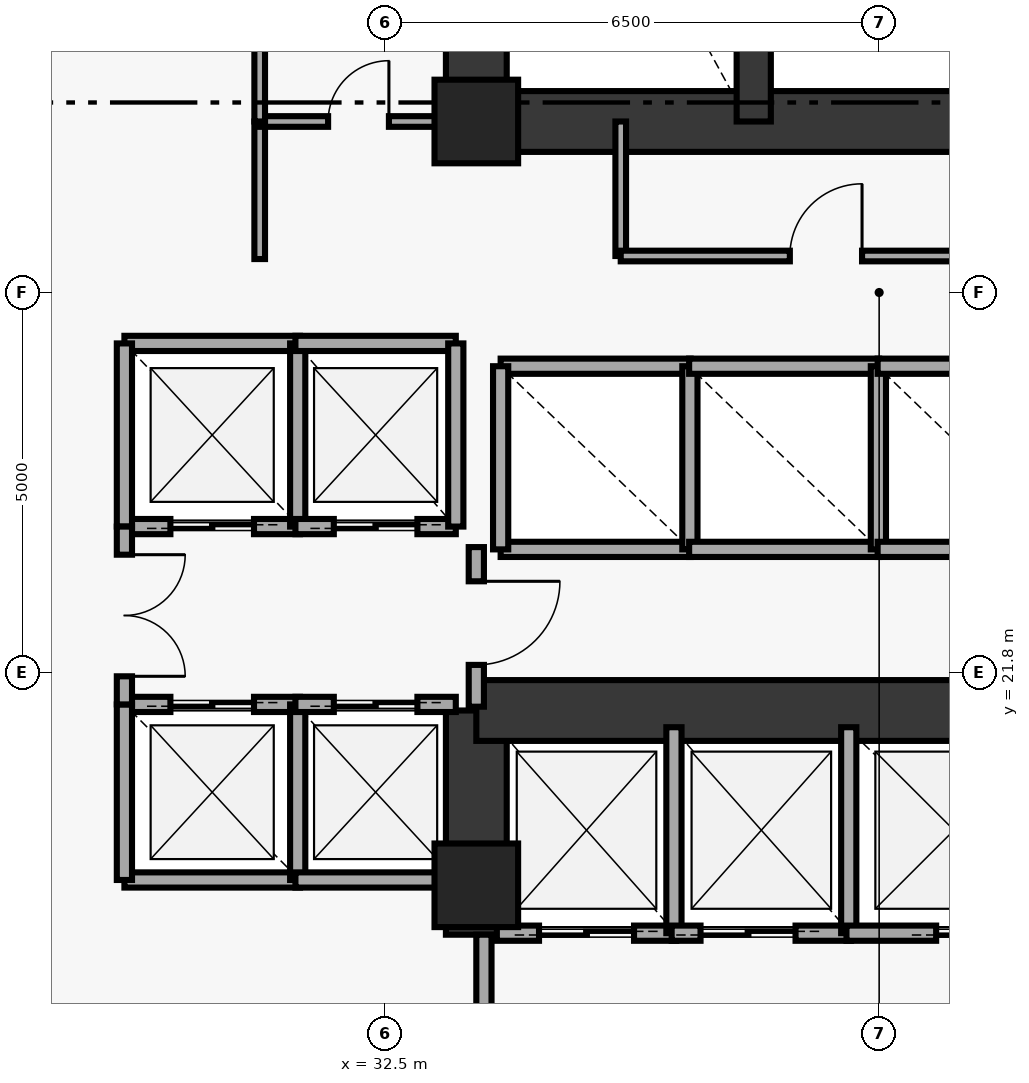
"""IFC4 building model, lengths in metres.
Left out: names, types, materials, properties, quantities, classifications, styles, units other than length and angle.
Written with IfcOpenShell. Run it as: python <this file> out.ifc"""

import sys

from ifc_helpers import new_model, si_unit, direction, frame, frame_2d, origin, origin_2d, place, context, subcontext, project, spatial, rectangle, extrude, element, fill, save


model = new_model("IFC4")
c1 = context("Model", 3, precision=1e-05, world=origin(), true_north=direction((0.0, 1.0)))
c2 = subcontext(c1, "Body", "Model", "MODEL_VIEW")
j1 = project(units=[si_unit("LENGTHUNIT", "METRE"), si_unit("PLANEANGLEUNIT", "RADIAN")], contexts=[c1])
p1 = place(None, origin())
s1 = spatial("IfcSite", under=j1, at=p1, CompositionType="ELEMENT")
p2 = place(p1, origin())
s2 = spatial("IfcBuilding", under=s1, at=p2, CompositionType="ELEMENT")
p3 = place(p2, frame((0.0, 0.0, 53.4)))
s3 = spatial("IfcBuildingStorey", under=s2, at=p3, CompositionType="ELEMENT", Elevation=53.4)
for number, where, z_axis, x_axis in (
    (1, (33.7, 19.0, 0.0), (0.0, 0.0, 1.0), (1.0, 0.0, 0.0)),
    (2, (33.7, 29.05, 0.0), (0.0, 0.0, 1.0), (1.0, 0.0, 0.0)),
):
    element("IfcColumn", number, at=place(p3, frame(where, z_axis=z_axis, x_axis=x_axis)), inside=s3, PredefinedType="PILASTER", context=c2, shape_type="SweptSolid", body=[
        extrude(rectangle(XDim=1.1, YDim=1.1, at=origin_2d()), origin(), (0.0, 0.0, 1.0), 3.8),
    ])
p4 = place(p3, frame((33.7, 29.05, 0.0), z_axis=(0.0, 0.0, 1.0), x_axis=(0.0, 1.0, 0.0)))
e3 = element("IfcWall", 3, at=p4, inside=s3, PredefinedType="SHEAR", context=c2, shape_type="SweptSolid", body=[
    extrude(rectangle(XDim=8.35, YDim=0.8, at=frame_2d((4.175, 0.0))), origin(), (0.0, 0.0, 1.0), 3.8),
])
p5 = place(p3, frame((33.7, 18.35, 0.0), z_axis=(0.0, 0.0, 1.0), x_axis=(0.0, 1.0, 0.0)))
e4 = element("IfcWall", 4, at=p5, inside=s3, PredefinedType="SHEAR", context=c2, shape_type="SweptSolid", body=[
    extrude(rectangle(XDim=2.95, YDim=0.8, at=frame_2d((1.475, 0.0))), origin(), (0.0, 0.0, 1.0), 3.8),
])
p6 = place(p3, frame((33.7, 29.05, 0.0), z_axis=(0.0, 0.0, 1.0), x_axis=(1.0, 0.0, 0.0)))
e5 = element("IfcWall", 5, at=p6, inside=s3, PredefinedType="SHEAR", context=c2, shape_type="SweptSolid", body=[
    extrude(rectangle(XDim=10.6, YDim=0.8, at=frame_2d((5.3, 0.0))), origin(), (0.0, 0.0, 1.0), 3.8),
])
p7 = place(p3, frame((33.7, 21.3, 0.0), z_axis=(0.0, 0.0, 1.0), x_axis=(1.0, 0.0, 0.0)))
e6 = element("IfcWall", 6, at=p7, inside=s3, PredefinedType="SHEAR", context=c2, shape_type="SweptSolid", body=[
    extrude(rectangle(XDim=7.55, YDim=0.8, at=frame_2d((3.775, 0.0))), origin(), (0.0, 0.0, 1.0), 3.8),
])
p8 = place(p3, frame((37.35, 29.05, 0.0), z_axis=(0.0, 0.0, 1.0), x_axis=(0.0, 1.0, 0.0)))
e7 = element("IfcWall", 7, at=p8, inside=s3, PredefinedType="SHEAR", context=c2, shape_type="SweptSolid", body=[
    extrude(rectangle(XDim=8.35, YDim=0.45, at=frame_2d((4.175, 0.0))), origin(), (0.0, 0.0, 1.0), 3.8),
])
p9 = place(p3, frame((35.6, 27.28, 0.0), z_axis=(0.0, 0.0, 1.0), x_axis=(0.0, 1.0, 0.0)))
e8 = element("IfcWall", 8, at=p9, inside=s3, PredefinedType="PARTITIONING", context=c2, shape_type="SweptSolid", body=[
    extrude(rectangle(XDim=1.77, YDim=0.14, at=frame_2d((0.885, 0.0))), origin(), (0.0, 0.0, 1.0), 3.8),
])
p10 = place(p3, frame((29.07, 23.72, 0.0), z_axis=(0.0, 0.0, 1.0), x_axis=(1.0, 0.0, 0.0)))
e9 = element("IfcWall", 9, at=p10, inside=s3, PredefinedType="SOLIDWALL", context=c2, shape_type="SweptSolid", body=[
    extrude(rectangle(XDim=2.31, YDim=0.2, at=frame_2d((1.155, 0.0))), origin(), (0.0, 0.0, 1.0), 3.8),
])
p11 = place(p10, frame((0.605, 0.0, 0.0)))
e10 = element("IfcOpeningElement", 10, at=p11, cuts=e9, PredefinedType="OPENING", context=c2, shape_type="SweptSolid", body=[
    extrude(rectangle(XDim=1.1, YDim=2.15, at=frame_2d((0.55, 1.075))), frame((0.0, 0.11, 0.0), z_axis=(0.0, -1.0, 0.0), x_axis=(1.0, 0.0, 0.0)), (0.0, 0.0, 1.0), 0.22),
])
p12 = place(p3, frame((29.07, 26.13, 0.0), z_axis=(0.0, 0.0, 1.0), x_axis=(1.0, 0.0, 0.0)))
e11 = element("IfcWall", 11, at=p12, inside=s3, PredefinedType="SOLIDWALL", context=c2, shape_type="SweptSolid", body=[
    extrude(rectangle(XDim=2.31, YDim=0.2, at=frame_2d((1.155, 0.0))), origin(), (0.0, 0.0, 1.0), 3.8),
])
for number, where, z_axis, x_axis in (
    (12, (29.07, 23.72, 0.0), (0.0, 0.0, 1.0), (0.0, 1.0, 0.0)),
    (13, (31.35, 23.72, 0.0), (0.0, 0.0, 1.0), (0.0, 1.0, 0.0)),
):
    element("IfcWall", number, at=place(p3, frame(where, z_axis=z_axis, x_axis=x_axis)), inside=s3, PredefinedType="SOLIDWALL", context=c2, shape_type="SweptSolid", body=[
        extrude(rectangle(XDim=2.41, YDim=0.2, at=frame_2d((1.205, 0.0))), origin(), (0.0, 0.0, 1.0), 3.8),
    ])
p13 = place(p3, frame((31.32, 23.72, 0.0), z_axis=(0.0, 0.0, 1.0), x_axis=(1.0, 0.0, 0.0)))
e14 = element("IfcWall", 14, at=p13, inside=s3, PredefinedType="SOLIDWALL", context=c2, shape_type="SweptSolid", body=[
    extrude(rectangle(XDim=2.11, YDim=0.2, at=frame_2d((1.055, 0.0))), origin(), (0.0, 0.0, 1.0), 3.8),
])
p14 = place(p13, frame((0.505, 0.0, 0.0)))
e15 = element("IfcOpeningElement", 15, at=p14, cuts=e14, PredefinedType="OPENING", context=c2, shape_type="SweptSolid", body=[
    extrude(rectangle(XDim=1.1, YDim=2.15, at=frame_2d((0.55, 1.075))), frame((0.0, 0.11, 0.0), z_axis=(0.0, -1.0, 0.0), x_axis=(1.0, 0.0, 0.0)), (0.0, 0.0, 1.0), 0.22),
])
p15 = place(p3, frame((31.32, 26.13, 0.0), z_axis=(0.0, 0.0, 1.0), x_axis=(1.0, 0.0, 0.0)))
e16 = element("IfcWall", 16, at=p15, inside=s3, PredefinedType="SOLIDWALL", context=c2, shape_type="SweptSolid", body=[
    extrude(rectangle(XDim=2.11, YDim=0.2, at=frame_2d((1.055, 0.0))), origin(), (0.0, 0.0, 1.0), 3.8),
])
p16 = place(p3, frame((33.43, 23.72, 0.0), z_axis=(0.0, 0.0, 1.0), x_axis=(0.0, 1.0, 0.0)))
e17 = element("IfcWall", 17, at=p16, inside=s3, PredefinedType="SOLIDWALL", context=c2, shape_type="SweptSolid", body=[
    extrude(rectangle(XDim=2.41, YDim=0.2, at=frame_2d((1.205, 0.0))), origin(), (0.0, 0.0, 1.0), 3.8),
])
p17 = place(p3, frame((29.07, 19.07, 0.0), z_axis=(0.0, 0.0, 1.0), x_axis=(1.0, 0.0, 0.0)))
e18 = element("IfcWall", 18, at=p17, inside=s3, PredefinedType="SOLIDWALL", context=c2, shape_type="SweptSolid", body=[
    extrude(rectangle(XDim=2.31, YDim=0.2, at=frame_2d((1.155, 0.0))), origin(), (0.0, 0.0, 1.0), 3.8),
])
p18 = place(p3, frame((29.07, 21.38, 0.0), z_axis=(0.0, 0.0, 1.0), x_axis=(1.0, 0.0, 0.0)))
e19 = element("IfcWall", 19, at=p18, inside=s3, PredefinedType="SOLIDWALL", context=c2, shape_type="SweptSolid", body=[
    extrude(rectangle(XDim=2.31, YDim=0.2, at=frame_2d((1.155, 0.0))), origin(), (0.0, 0.0, 1.0), 3.8),
])
p19 = place(p18, frame((0.605, 0.0, 0.0)))
e20 = element("IfcOpeningElement", 20, at=p19, cuts=e19, PredefinedType="OPENING", context=c2, shape_type="SweptSolid", body=[
    extrude(rectangle(XDim=1.1, YDim=2.15, at=frame_2d((0.55, 1.075))), frame((0.0, 0.11, 0.0), z_axis=(0.0, -1.0, 0.0), x_axis=(1.0, 0.0, 0.0)), (0.0, 0.0, 1.0), 0.22),
])
for number, where, z_axis, x_axis in (
    (21, (29.07, 19.07, 0.0), (0.0, 0.0, 1.0), (0.0, 1.0, 0.0)),
    (22, (31.35, 19.07, 0.0), (0.0, 0.0, 1.0), (0.0, 1.0, 0.0)),
):
    element("IfcWall", number, at=place(p3, frame(where, z_axis=z_axis, x_axis=x_axis)), inside=s3, PredefinedType="SOLIDWALL", context=c2, shape_type="SweptSolid", body=[
        extrude(rectangle(XDim=2.31, YDim=0.2, at=frame_2d((1.155, 0.0))), origin(), (0.0, 0.0, 1.0), 3.8),
    ])
p20 = place(p3, frame((31.32, 19.07, 0.0), z_axis=(0.0, 0.0, 1.0), x_axis=(1.0, 0.0, 0.0)))
e23 = element("IfcWall", 23, at=p20, inside=s3, PredefinedType="SOLIDWALL", context=c2, shape_type="SweptSolid", body=[
    extrude(rectangle(XDim=2.11, YDim=0.2, at=frame_2d((1.055, 0.0))), origin(), (0.0, 0.0, 1.0), 3.8),
])
p21 = place(p3, frame((31.32, 21.38, 0.0), z_axis=(0.0, 0.0, 1.0), x_axis=(1.0, 0.0, 0.0)))
e24 = element("IfcWall", 24, at=p21, inside=s3, PredefinedType="SOLIDWALL", context=c2, shape_type="SweptSolid", body=[
    extrude(rectangle(XDim=2.11, YDim=0.2, at=frame_2d((1.055, 0.0))), origin(), (0.0, 0.0, 1.0), 3.8),
])
p22 = place(p21, frame((0.505, 0.0, 0.0)))
e25 = element("IfcOpeningElement", 25, at=p22, cuts=e24, PredefinedType="OPENING", context=c2, shape_type="SweptSolid", body=[
    extrude(rectangle(XDim=1.1, YDim=2.15, at=frame_2d((0.55, 1.075))), frame((0.0, 0.11, 0.0), z_axis=(0.0, -1.0, 0.0), x_axis=(1.0, 0.0, 0.0)), (0.0, 0.0, 1.0), 0.22),
])
for number, where, z_axis, x_axis in (
    (26, (34.02, 23.42, 0.0), (0.0, 0.0, 1.0), (1.0, 0.0, 0.0)),
    (27, (34.02, 25.83, 0.0), (0.0, 0.0, 1.0), (1.0, 0.0, 0.0)),
):
    element("IfcWall", number, at=place(p3, frame(where, z_axis=z_axis, x_axis=x_axis)), inside=s3, PredefinedType="SOLIDWALL", context=c2, shape_type="SweptSolid", body=[
        extrude(rectangle(XDim=2.5, YDim=0.2, at=frame_2d((1.25, 0.0))), origin(), (0.0, 0.0, 1.0), 3.8),
    ])
for number, where, z_axis, x_axis in (
    (28, (34.02, 23.42, 0.0), (0.0, 0.0, 1.0), (0.0, 1.0, 0.0)),
    (29, (36.51, 23.42, 0.0), (0.0, 0.0, 1.0), (0.0, 1.0, 0.0)),
):
    element("IfcWall", number, at=place(p3, frame(where, z_axis=z_axis, x_axis=x_axis)), inside=s3, PredefinedType="SOLIDWALL", context=c2, shape_type="SweptSolid", body=[
        extrude(rectangle(XDim=2.41, YDim=0.2, at=frame_2d((1.205, 0.0))), origin(), (0.0, 0.0, 1.0), 3.8),
    ])
for number, where, z_axis, x_axis in (
    (30, (36.5, 23.42, 0.0), (0.0, 0.0, 1.0), (1.0, 0.0, 0.0)),
    (31, (36.5, 25.83, 0.0), (0.0, 0.0, 1.0), (1.0, 0.0, 0.0)),
):
    element("IfcWall", number, at=place(p3, frame(where, z_axis=z_axis, x_axis=x_axis)), inside=s3, PredefinedType="SOLIDWALL", context=c2, shape_type="SweptSolid", body=[
        extrude(rectangle(XDim=2.5, YDim=0.2, at=frame_2d((1.25, 0.0))), origin(), (0.0, 0.0, 1.0), 3.8),
    ])
p23 = place(p3, frame((38.99, 23.42, 0.0), z_axis=(0.0, 0.0, 1.0), x_axis=(0.0, 1.0, 0.0)))
e32 = element("IfcWall", 32, at=p23, inside=s3, PredefinedType="SOLIDWALL", context=c2, shape_type="SweptSolid", body=[
    extrude(rectangle(XDim=2.41, YDim=0.2, at=frame_2d((1.205, 0.0))), origin(), (0.0, 0.0, 1.0), 3.8),
])
for number, where, z_axis, x_axis in (
    (33, (38.98, 23.42, 0.0), (0.0, 0.0, 1.0), (1.0, 0.0, 0.0)),
    (34, (38.98, 25.83, 0.0), (0.0, 0.0, 1.0), (1.0, 0.0, 0.0)),
):
    element("IfcWall", number, at=place(p3, frame(where, z_axis=z_axis, x_axis=x_axis)), inside=s3, PredefinedType="SOLIDWALL", context=c2, shape_type="SweptSolid", body=[
        extrude(rectangle(XDim=2.5, YDim=0.2, at=frame_2d((1.25, 0.0))), origin(), (0.0, 0.0, 1.0), 3.8),
    ])
p24 = place(p3, frame((33.97, 18.37, 0.0), z_axis=(0.0, 0.0, 1.0), x_axis=(1.0, 0.0, 0.0)))
e35 = element("IfcWall", 35, at=p24, inside=s3, PredefinedType="SOLIDWALL", context=c2, shape_type="SweptSolid", body=[
    extrude(rectangle(XDim=2.36, YDim=0.2, at=frame_2d((1.18, 0.0))), origin(), (0.0, 0.0, 1.0), 3.8),
])
p25 = place(p24, frame((0.555, 0.0, 0.0)))
e36 = element("IfcOpeningElement", 36, at=p25, cuts=e35, PredefinedType="OPENING", context=c2, shape_type="SweptSolid", body=[
    extrude(rectangle(XDim=1.25, YDim=2.2, at=frame_2d((0.625, 1.1))), frame((0.0, 0.11, 0.0), z_axis=(0.0, -1.0, 0.0), x_axis=(1.0, 0.0, 0.0)), (0.0, 0.0, 1.0), 0.22),
])
p26 = place(p3, frame((36.3, 18.37, 0.0), z_axis=(0.0, 0.0, 1.0), x_axis=(0.0, 1.0, 0.0)))
e37 = element("IfcWall", 37, at=p26, inside=s3, PredefinedType="SOLIDWALL", context=c2, shape_type="SweptSolid", body=[
    extrude(rectangle(XDim=2.71, YDim=0.2, at=frame_2d((1.355, 0.0))), origin(), (0.0, 0.0, 1.0), 3.8),
])
p27 = place(p3, frame((36.27, 18.37, 0.0), z_axis=(0.0, 0.0, 1.0), x_axis=(1.0, 0.0, 0.0)))
e38 = element("IfcWall", 38, at=p27, inside=s3, PredefinedType="SOLIDWALL", context=c2, shape_type="SweptSolid", body=[
    extrude(rectangle(XDim=2.36, YDim=0.2, at=frame_2d((1.18, 0.0))), origin(), (0.0, 0.0, 1.0), 3.8),
])
p28 = place(p27, frame((0.38, 0.0, 0.0)))
e39 = element("IfcOpeningElement", 39, at=p28, cuts=e38, PredefinedType="OPENING", context=c2, shape_type="SweptSolid", body=[
    extrude(rectangle(XDim=1.25, YDim=2.2, at=frame_2d((0.625, 1.1))), frame((0.0, 0.11, 0.0), z_axis=(0.0, -1.0, 0.0), x_axis=(1.0, 0.0, 0.0)), (0.0, 0.0, 1.0), 0.22),
])
p29 = place(p3, frame((38.6, 18.37, 0.0), z_axis=(0.0, 0.0, 1.0), x_axis=(0.0, 1.0, 0.0)))
e40 = element("IfcWall", 40, at=p29, inside=s3, PredefinedType="SOLIDWALL", context=c2, shape_type="SweptSolid", body=[
    extrude(rectangle(XDim=2.71, YDim=0.2, at=frame_2d((1.355, 0.0))), origin(), (0.0, 0.0, 1.0), 3.8),
])
p30 = place(p3, frame((38.57, 18.37, 0.0), z_axis=(0.0, 0.0, 1.0), x_axis=(1.0, 0.0, 0.0)))
e41 = element("IfcWall", 41, at=p30, inside=s3, PredefinedType="SOLIDWALL", context=c2, shape_type="SweptSolid", body=[
    extrude(rectangle(XDim=2.83, YDim=0.2, at=frame_2d((1.415, 0.0))), origin(), (0.0, 0.0, 1.0), 3.8),
])
p31 = place(p30, frame((1.18, 0.0, 0.0)))
e42 = element("IfcOpeningElement", 42, at=p31, cuts=e41, PredefinedType="OPENING", context=c2, shape_type="SweptSolid", body=[
    extrude(rectangle(XDim=1.35, YDim=2.18, at=frame_2d((0.675, 1.09))), frame((0.0, 0.11, 0.0), z_axis=(0.0, -1.0, 0.0), x_axis=(1.0, 0.0, 0.0)), (0.0, 0.0, 1.0), 0.22),
])
p32 = place(p3, frame((29.07, 21.38, 0.0), z_axis=(0.0, 0.0, 1.0), x_axis=(0.0, 1.0, 0.0)))
e43 = element("IfcWall", 43, at=p32, inside=s3, PredefinedType="SOLIDWALL", context=c2, shape_type="SweptSolid", body=[
    extrude(rectangle(XDim=2.34, YDim=0.2, at=frame_2d((1.17, 0.0))), origin(), (0.0, 0.0, 1.0), 3.8),
])
p33 = place(p32, frame((0.37, 0.0, 0.0)))
e44 = element("IfcOpeningElement", 44, at=p33, cuts=e43, PredefinedType="OPENING", context=c2, shape_type="SweptSolid", body=[
    extrude(rectangle(XDim=1.6, YDim=2.2, at=frame_2d((0.8, 1.1))), frame((0.0, 0.11, 0.0), z_axis=(0.0, -1.0, 0.0), x_axis=(1.0, 0.0, 0.0)), (0.0, 0.0, 1.0), 0.22),
])
p34 = place(p3, frame((33.7, 21.35, 0.0), z_axis=(0.0, 0.0, 1.0), x_axis=(0.0, 1.0, 0.0)))
e45 = element("IfcWall", 45, at=p34, inside=s3, PredefinedType="SOLIDWALL", context=c2, shape_type="SweptSolid", body=[
    extrude(rectangle(XDim=2.1, YDim=0.2, at=frame_2d((1.05, 0.0))), origin(), (0.0, 0.0, 1.0), 3.02),
])
p35 = place(p34, frame((0.55, 0.0, 0.0)))
e46 = element("IfcOpeningElement", 46, at=p35, cuts=e45, PredefinedType="OPENING", context=c2, shape_type="SweptSolid", body=[
    extrude(rectangle(XDim=1.1, YDim=2.15, at=frame_2d((0.55, 1.075))), frame((0.0, 0.11, 0.0), z_axis=(0.0, -1.0, 0.0), x_axis=(1.0, 0.0, 0.0)), (0.0, 0.0, 1.0), 0.22),
])
p36 = place(p3, frame((33.8, 15.55, 0.0), z_axis=(0.0, 0.0, 1.0), x_axis=(0.0, 1.0, 0.0)))
e47 = element("IfcWall", 47, at=p36, inside=s3, PredefinedType="SOLIDWALL", context=c2, shape_type="SweptSolid", body=[
    extrude(rectangle(XDim=2.8, YDim=0.2, at=frame_2d((1.4, 0.0))), origin(), (0.0, 0.0, 1.0), 3.8),
])
p37 = place(p3, frame((35.6, 27.28, 0.0), z_axis=(0.0, 0.0, 1.0), x_axis=(1.0, 0.0, 0.0)))
e48 = element("IfcWall", 48, at=p37, inside=s3, PredefinedType="PARTITIONING", context=c2, shape_type="SweptSolid", body=[
    extrude(rectangle(XDim=5.4, YDim=0.14, at=frame_2d((2.7, 0.0))), origin(), (0.0, 0.0, 1.0), 3.8),
])
p38 = place(p37, frame((2.225, 0.0, 0.0)))
e49 = element("IfcOpeningElement", 49, at=p38, cuts=e48, PredefinedType="OPENING", context=c2, shape_type="SweptSolid", body=[
    extrude(rectangle(XDim=0.95, YDim=2.1, at=frame_2d((0.475, 1.05))), frame((0.0, 0.08, 0.0), z_axis=(0.0, -1.0, 0.0), x_axis=(1.0, 0.0, 0.0)), (0.0, 0.0, 1.0), 0.16),
])
p39 = place(p3, frame((30.85, 27.24, 0.0), z_axis=(0.0, 0.0, 1.0), x_axis=(0.0, 1.0, 0.0)))
e50 = element("IfcWall", 50, at=p39, inside=s3, PredefinedType="PARTITIONING", context=c2, shape_type="SweptSolid", body=[
    extrude(rectangle(XDim=1.81, YDim=0.14, at=frame_2d((0.905, 0.0))), origin(), (0.0, 0.0, 1.0), 3.8),
])
p40 = place(p3, frame((30.85, 29.05, 0.0), z_axis=(0.0, 0.0, 1.0), x_axis=(1.0, 0.0, 0.0)))
e51 = element("IfcWall", 51, at=p40, inside=s3, PredefinedType="PARTITIONING", context=c2, shape_type="SweptSolid", body=[
    extrude(rectangle(XDim=2.6, YDim=0.14, at=frame_2d((1.3, 0.0))), origin(), (0.0, 0.0, 1.0), 2.79),
])
p41 = place(p40, frame((0.9, 0.0, 0.0)))
e52 = element("IfcOpeningElement", 52, at=p41, cuts=e51, PredefinedType="OPENING", context=c2, shape_type="SweptSolid", body=[
    extrude(rectangle(XDim=0.8, YDim=2.05, at=frame_2d((0.4, 1.025))), frame((0.0, 0.08, 0.0), z_axis=(0.0, -1.0, 0.0), x_axis=(1.0, 0.0, 0.0)), (0.0, 0.0, 1.0), 0.16),
])
p42 = place(p3, frame((30.85, 29.05, 0.0), z_axis=(0.0, 0.0, 1.0), x_axis=(0.0, 1.0, 0.0)))
e53 = element("IfcWall", 53, at=p42, inside=s3, PredefinedType="PARTITIONING", context=c2, shape_type="SweptSolid", body=[
    extrude(rectangle(XDim=5.6, YDim=0.14, at=frame_2d((2.8, 0.0))), origin(), (0.0, 0.0, 1.0), 3.8),
])
p43 = place(p3, frame((25.005, 22.45, 0.0), z_axis=(0.0, 0.0, 1.0), x_axis=(0.452560985886, -0.8917334546, 0.0)))
e54 = element("IfcWall", 54, at=p43, inside=s3, PredefinedType="PARTITIONING", context=c2, shape_type="SweptSolid", body=[
    extrude(rectangle(XDim=8.388, YDim=0.16, at=frame_2d((4.194, 0.0))), origin(), (0.0, 0.0, 1.0), 3.8),
])
p44 = place(p11, origin())
e55 = element("IfcDoor", 55, at=p44, inside=s3, OperationType="DOUBLE_DOOR_SLIDING", PredefinedType="DOOR", context=c2, shape_type="SweptSolid", body=[
    extrude(rectangle(XDim=1.1, YDim=2.15, at=frame_2d((0.55, 1.075))), frame((0.0, 0.025, 0.0), z_axis=(0.0, -1.0, 0.0), x_axis=(1.0, 0.0, 0.0)), (0.0, 0.0, 1.0), 0.05),
])
fill(e10, e55)
p45 = place(p14, origin())
e56 = element("IfcDoor", 56, at=p45, inside=s3, OperationType="DOUBLE_DOOR_SLIDING", PredefinedType="DOOR", context=c2, shape_type="SweptSolid", body=[
    extrude(rectangle(XDim=1.1, YDim=2.15, at=frame_2d((0.55, 1.075))), frame((0.0, 0.025, 0.0), z_axis=(0.0, -1.0, 0.0), x_axis=(1.0, 0.0, 0.0)), (0.0, 0.0, 1.0), 0.05),
])
fill(e15, e56)
p46 = place(p19, origin())
e57 = element("IfcDoor", 57, at=p46, inside=s3, OperationType="DOUBLE_DOOR_SLIDING", PredefinedType="DOOR", context=c2, shape_type="SweptSolid", body=[
    extrude(rectangle(XDim=1.1, YDim=2.15, at=frame_2d((0.55, 1.075))), frame((0.0, 0.025, 0.0), z_axis=(0.0, -1.0, 0.0), x_axis=(1.0, 0.0, 0.0)), (0.0, 0.0, 1.0), 0.05),
])
fill(e20, e57)
p47 = place(p22, origin())
e58 = element("IfcDoor", 58, at=p47, inside=s3, OperationType="DOUBLE_DOOR_SLIDING", PredefinedType="DOOR", context=c2, shape_type="SweptSolid", body=[
    extrude(rectangle(XDim=1.1, YDim=2.15, at=frame_2d((0.55, 1.075))), frame((0.0, 0.025, 0.0), z_axis=(0.0, -1.0, 0.0), x_axis=(1.0, 0.0, 0.0)), (0.0, 0.0, 1.0), 0.05),
])
fill(e25, e58)
p48 = place(p25, origin())
e59 = element("IfcDoor", 59, at=p48, inside=s3, OperationType="DOUBLE_DOOR_SLIDING", PredefinedType="DOOR", context=c2, shape_type="SweptSolid", body=[
    extrude(rectangle(XDim=1.25, YDim=2.2, at=frame_2d((0.625, 1.1))), frame((0.0, 0.025, 0.0), z_axis=(0.0, -1.0, 0.0), x_axis=(1.0, 0.0, 0.0)), (0.0, 0.0, 1.0), 0.05),
])
fill(e36, e59)
p49 = place(p28, origin())
e60 = element("IfcDoor", 60, at=p49, inside=s3, OperationType="DOUBLE_DOOR_SLIDING", PredefinedType="DOOR", context=c2, shape_type="SweptSolid", body=[
    extrude(rectangle(XDim=1.25, YDim=2.2, at=frame_2d((0.625, 1.1))), frame((0.0, 0.025, 0.0), z_axis=(0.0, -1.0, 0.0), x_axis=(1.0, 0.0, 0.0)), (0.0, 0.0, 1.0), 0.05),
])
fill(e39, e60)
p50 = place(p31, origin())
e61 = element("IfcDoor", 61, at=p50, inside=s3, OperationType="DOUBLE_DOOR_SLIDING", PredefinedType="DOOR", context=c2, shape_type="SweptSolid", body=[
    extrude(rectangle(XDim=1.35, YDim=2.18, at=frame_2d((0.675, 1.09))), frame((0.0, 0.025, 0.0), z_axis=(0.0, -1.0, 0.0), x_axis=(1.0, 0.0, 0.0)), (0.0, 0.0, 1.0), 0.05),
])
fill(e42, e61)
p51 = place(p33, origin())
e62 = element("IfcDoor", 62, at=p51, inside=s3, OperationType="DOUBLE_DOOR_SINGLE_SWING", PredefinedType="DOOR", context=c2, shape_type="SweptSolid", body=[
    extrude(rectangle(XDim=1.6, YDim=2.2, at=frame_2d((0.8, 1.1))), frame((0.0, 0.025, 0.0), z_axis=(0.0, -1.0, 0.0), x_axis=(1.0, 0.0, 0.0)), (0.0, 0.0, 1.0), 0.05),
])
fill(e44, e62)
p52 = place(p35, origin())
e63 = element("IfcDoor", 63, at=p52, inside=s3, OperationType="SINGLE_SWING_RIGHT", PredefinedType="DOOR", context=c2, shape_type="SweptSolid", body=[
    extrude(rectangle(XDim=1.1, YDim=2.15, at=frame_2d((0.55, 1.075))), frame((0.0, 0.025, 0.0), z_axis=(0.0, -1.0, 0.0), x_axis=(1.0, 0.0, 0.0)), (0.0, 0.0, 1.0), 0.05),
])
fill(e46, e63)
p53 = place(p38, origin())
e64 = element("IfcDoor", 64, at=p53, inside=s3, OperationType="SINGLE_SWING_RIGHT", PredefinedType="DOOR", context=c2, shape_type="SweptSolid", body=[
    extrude(rectangle(XDim=0.95, YDim=2.1, at=frame_2d((0.475, 1.05))), frame((0.0, 0.025, 0.0), z_axis=(0.0, -1.0, 0.0), x_axis=(1.0, 0.0, 0.0)), (0.0, 0.0, 1.0), 0.05),
])
fill(e49, e64)
p54 = place(p41, origin())
e65 = element("IfcDoor", 65, at=p54, inside=s3, OperationType="SINGLE_SWING_RIGHT", PredefinedType="DOOR", context=c2, shape_type="SweptSolid", body=[
    extrude(rectangle(XDim=0.8, YDim=2.05, at=frame_2d((0.4, 1.025))), frame((0.0, 0.025, 0.0), z_axis=(0.0, -1.0, 0.0), x_axis=(1.0, 0.0, 0.0)), (0.0, 0.0, 1.0), 0.05),
])
fill(e52, e65)
save(model, sys.argv[1])
